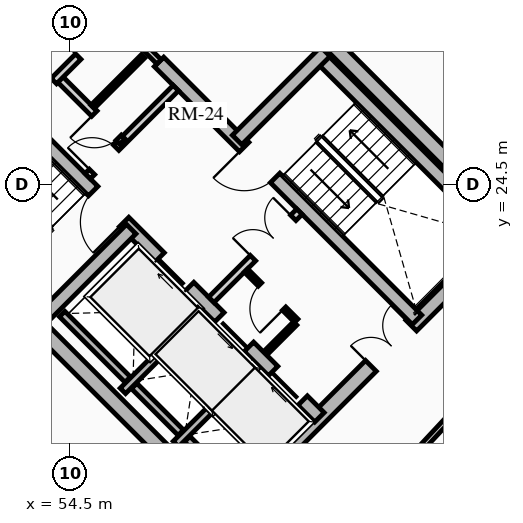
"""IFC4 building model, lengths in metres.
Left out: names, types, materials, properties, quantities, classifications, styles, units other than length and angle.
Written with IfcOpenShell. Run it as: python <this file> out.ifc"""

import sys

from ifc_helpers import new_model, si_unit, direction, frame, frame_2d, origin, place, context, subcontext, project, spatial, rectangle, extrude, source, transform, mapped, element, fill, save


model = new_model("IFC4")
c1 = context("Model", 3, precision=1e-05, world=origin(), true_north=direction((0.0, 1.0)))
c2 = subcontext(c1, "Body", "Model", "MODEL_VIEW")
j1 = project(units=[si_unit("LENGTHUNIT", "METRE"), si_unit("PLANEANGLEUNIT", "RADIAN")], contexts=[c1])
p1 = place(None, origin())
s1 = spatial("IfcSite", under=j1, at=p1, CompositionType="ELEMENT")
p2 = place(p1, origin())
s2 = spatial("IfcBuilding", under=s1, at=p2, CompositionType="ELEMENT")
p3 = place(p2, frame((0.0, 0.0, 208.3)))
s3 = spatial("IfcBuildingStorey", under=s2, at=p3, CompositionType="ELEMENT", Elevation=208.3)
for number, where, z_axis, x_axis in (
    (1, (58.702, 15.732, 0.0), (0.0, 0.0, 1.0), (-0.707, 0.707, 0.0)),
    (2, (66.268, 23.298, 0.0), (0.0, 0.0, 1.0), (-0.707, 0.707, 0.0)),
):
    element("IfcWall", number, at=place(p3, frame(where, z_axis=z_axis, x_axis=x_axis)), inside=s3, PredefinedType="SHEAR", context=c2, shape_type="SweptSolid", body=[
        extrude(rectangle(XDim=14.1, YDim=0.4, at=frame_2d((7.05, 0.0))), origin(), (0.0, 0.0, 1.0), 2.91),
    ])
p4 = place(p3, frame((58.561, 15.873, 0.0), z_axis=(0.0, 0.0, 1.0), x_axis=(0.707106781187, 0.707106781187, 0.0)))
e3 = element("IfcWall", 3, at=p4, inside=s3, PredefinedType="SHEAR", context=c2, shape_type="SweptSolid", body=[
    extrude(rectangle(XDim=10.7, YDim=0.4, at=frame_2d((5.35, 0.0))), origin(), (0.0, 0.0, 1.0), 2.91),
])
m1 = source(origin(), c2, "Body", "SweptSolid", [
    extrude(rectangle(XDim=1.5, YDim=2.02, at=frame_2d((0.75, 1.01))), frame((0.0, 0.21, 0.0), z_axis=(0.0, -1.0, 0.0), x_axis=(1.0, 0.0, 0.0)), (0.0, 0.0, 1.0), 0.42),
])
p5 = place(p4, frame((5.45, 0.0, 0.0)))
e4 = element("IfcOpeningElement", 4, at=p5, cuts=e3, PredefinedType="OPENING", context=c2, shape_type="MappedRepresentation", body=[
    mapped(m1, transform((0.0, 0.0, 0.0), x_axis=(1.0, 0.0, 0.0), y_axis=(0.0, 1.0, 0.0), z_axis=(0.0, 0.0, 1.0), scale=1.0)),
])
p6 = place(p3, frame((48.873, 25.561, 0.0), z_axis=(0.0, 0.0, 1.0), x_axis=(0.707106781187, 0.707106781187, 0.0)))
e5 = element("IfcWall", 5, at=p6, inside=s3, PredefinedType="SHEAR", context=c2, shape_type="SweptSolid", body=[
    extrude(rectangle(XDim=10.7, YDim=0.4, at=frame_2d((5.35, 0.0))), origin(), (0.0, 0.0, 1.0), 2.91),
])
p7 = place(p6, frame((4.6, 0.0, 0.0)))
e6 = element("IfcOpeningElement", 6, at=p7, cuts=e5, PredefinedType="OPENING", context=c2, shape_type="MappedRepresentation", body=[
    mapped(m1, transform((0.0, 0.0, 0.0), x_axis=(1.0, 0.0, 0.0), y_axis=(0.0, 1.0, 0.0), z_axis=(0.0, 0.0, 1.0), scale=1.0)),
])
p8 = place(p3, frame((61.06, 18.373, 0.0), z_axis=(0.0, 0.0, 1.0), x_axis=(-0.707106781187, 0.707106781187, 0.0)))
e7 = element("IfcWall", 7, at=p8, inside=s3, PredefinedType="SHEAR", context=c2, shape_type="SweptSolid", body=[
    extrude(rectangle(XDim=13.7, YDim=0.35, at=frame_2d((6.85, 0.0))), origin(), (0.0, 0.0, 1.0), 2.91),
])
m2 = source(origin(), c2, "Body", "SweptSolid", [
    extrude(rectangle(XDim=1.1, YDim=2.015, at=frame_2d((0.55, 1.007))), frame((0.0, 0.185, 0.0), z_axis=(0.0, -1.0, 0.0), x_axis=(1.0, 0.0, 0.0)), (0.0, 0.0, 1.0), 0.37),
])
p9 = place(p8, frame((4.85, 0.0, 0.0)))
e8 = element("IfcOpeningElement", 8, at=p9, cuts=e7, PredefinedType="OPENING", context=c2, shape_type="MappedRepresentation", body=[
    mapped(m2, transform((0.0, 0.0, 0.0), x_axis=(1.0, 0.0, 0.0), y_axis=(0.0, 1.0, 0.0), z_axis=(0.0, 0.0, 1.0), scale=1.0)),
])
p10 = place(p8, frame((0.625, 0.0, 0.0)))
e9 = element("IfcOpeningElement", 9, at=p10, cuts=e7, PredefinedType="OPENING", context=c2, shape_type="MappedRepresentation", body=[
    mapped(m2, transform((0.0, 0.0, 0.0), x_axis=(1.0, 0.0, 0.0), y_axis=(0.0, 1.0, 0.0), z_axis=(0.0, 0.0, 1.0), scale=1.0)),
])
p11 = place(p8, frame((2.625, 0.0, 0.0)))
e10 = element("IfcOpeningElement", 10, at=p11, cuts=e7, PredefinedType="OPENING", context=c2, shape_type="MappedRepresentation", body=[
    mapped(m2, transform((0.0, 0.0, 0.0), x_axis=(1.0, 0.0, 0.0), y_axis=(0.0, 1.0, 0.0), z_axis=(0.0, 0.0, 1.0), scale=1.0)),
])
m3 = source(origin(), c2, "Body", "SweptSolid", [
    extrude(rectangle(XDim=1.15, YDim=2.02, at=frame_2d((0.575, 1.01))), frame((0.0, 0.185, 0.0), z_axis=(0.0, -1.0, 0.0), x_axis=(1.0, 0.0, 0.0)), (0.0, 0.0, 1.0), 0.37),
])
p12 = place(p8, frame((7.27, 0.0, 0.0)))
e11 = element("IfcOpeningElement", 11, at=p12, cuts=e7, PredefinedType="OPENING", context=c2, shape_type="MappedRepresentation", body=[
    mapped(m3, transform((0.0, 0.0, 0.0), x_axis=(1.0, 0.0, 0.0), y_axis=(0.0, 1.0, 0.0), z_axis=(0.0, 0.0, 1.0), scale=1.0)),
])
p13 = place(p3, frame((63.627, 20.94, 0.0), z_axis=(0.0, 0.0, 1.0), x_axis=(-0.707119496762, 0.707094065383, 0.0)))
e12 = element("IfcWall", 12, at=p13, inside=s3, PredefinedType="SHEAR", context=c2, shape_type="SweptSolid", body=[
    extrude(rectangle(XDim=9.6, YDim=0.35, at=frame_2d((4.8, 0.0))), origin(), (0.0, 0.0, 1.0), 2.91),
])
p14 = place(p13, frame((5.28, 0.0, 0.0)))
e13 = element("IfcOpeningElement", 13, at=p14, cuts=e12, PredefinedType="OPENING", context=c2, shape_type="MappedRepresentation", body=[
    mapped(m3, transform((0.0, 0.0, 0.0), x_axis=(1.0, 0.0, 0.0), y_axis=(0.0, 1.0, 0.0), z_axis=(0.0, 0.0, 1.0), scale=1.0)),
])
p15 = place(p3, frame((53.922, 21.141, 0.0), z_axis=(0.0, 0.0, 1.0), x_axis=(-0.707106781187, 0.707106781187, 0.0)))
e14 = element("IfcWall", 14, at=p15, inside=s3, PredefinedType="SHEAR", context=c2, shape_type="SweptSolid", body=[
    extrude(rectangle(XDim=6.695, YDim=0.35, at=frame_2d((3.348, 0.0))), origin(), (0.0, 0.0, 1.0), 2.91),
])
p16 = place(p3, frame((53.784, 21.003, 0.0), z_axis=(0.0, 0.0, 1.0), x_axis=(0.707106781187, 0.707106781187, 0.0)))
e15 = element("IfcWall", 15, at=p16, inside=s3, PredefinedType="SHEAR", context=c2, shape_type="SweptSolid", body=[
    extrude(rectangle(XDim=3.285, YDim=0.35, at=frame_2d((1.643, 0.0))), origin(), (0.0, 0.0, 1.0), 2.91),
])
p17 = place(p3, frame((65.812, 23.125, 0.0), z_axis=(0.0, 0.0, 1.0), x_axis=(-0.707106781187, 0.707106781187, 0.0)))
e16 = element("IfcWall", 16, at=p17, inside=s3, PredefinedType="SHEAR", context=c2, shape_type="SweptSolid", body=[
    extrude(rectangle(XDim=6.695, YDim=0.35, at=frame_2d((3.348, 0.0))), origin(), (0.0, 0.0, 1.0), 2.91),
])
p18 = place(p3, frame((58.893, 25.674, 0.0), z_axis=(0.0, 0.0, 1.0), x_axis=(0.707106781187, 0.707106781187, 0.0)))
e17 = element("IfcWall", 17, at=p18, inside=s3, PredefinedType="SHEAR", context=c2, shape_type="SweptSolid", body=[
    extrude(rectangle(XDim=3.285, YDim=0.35, at=frame_2d((1.643, 0.0))), origin(), (0.0, 0.0, 1.0), 2.91),
])
p19 = place(p3, frame((55.888, 19.069, 0.0), z_axis=(0.0, 0.0, 1.0), x_axis=(0.707106781187, 0.707106781187, 0.0)))
e18 = element("IfcWall", 18, at=p19, inside=s3, PredefinedType="SHEAR", context=c2, shape_type="SweptSolid", body=[
    extrude(rectangle(XDim=2.97, YDim=0.2, at=frame_2d((1.485, 0.0))), origin(), (0.0, 0.0, 1.0), 2.91),
])
p20 = place(p3, frame((56.015, 19.366, 0.0), z_axis=(0.0, 0.0, 1.0), x_axis=(-0.707106781187, 0.707106781187, 0.0)))
e19 = element("IfcWall", 19, at=p20, inside=s3, PredefinedType="SHEAR", context=c2, shape_type="SweptSolid", body=[
    extrude(rectangle(XDim=2.44, YDim=0.2, at=frame_2d((1.22, 0.0))), origin(), (0.0, 0.0, 1.0), 2.91),
])
p21 = place(p3, frame((57.284, 17.673, 0.0), z_axis=(0.0, 0.0, 1.0), x_axis=(0.707147878904, 0.70706568108, 0.0)))
e20 = element("IfcWall", 20, at=p21, inside=s3, PredefinedType="SHEAR", context=c2, shape_type="SweptSolid", body=[
    extrude(rectangle(XDim=2.97, YDim=0.2, at=frame_2d((1.485, 0.0))), origin(), (0.0, 0.0, 1.0), 2.91),
])
p22 = place(p3, frame((57.412, 17.97, 0.0), z_axis=(0.0, 0.0, 1.0), x_axis=(-0.707106781187, 0.707106781187, 0.0)))
e21 = element("IfcWall", 21, at=p22, inside=s3, PredefinedType="SHEAR", context=c2, shape_type="SweptSolid", body=[
    extrude(rectangle(XDim=1.735, YDim=0.2, at=frame_2d((0.867, 0.0))), origin(), (0.0, 0.0, 1.0), 2.91),
])
p23 = place(p3, frame((58.737, 16.644, 0.0), z_axis=(0.0, 0.0, 1.0), x_axis=(-0.707032117043, 0.707181437447, 0.0)))
e22 = element("IfcWall", 22, at=p23, inside=s3, PredefinedType="SHEAR", context=c2, shape_type="SweptSolid", body=[
    extrude(rectangle(XDim=1.635, YDim=0.2, at=frame_2d((0.817, 0.0))), origin(), (0.0, 0.0, 1.0), 2.91),
])
p24 = place(p3, frame((58.214, 21.467, 0.0), z_axis=(0.0, 0.0, 1.0), x_axis=(0.707106781187, 0.707106781187, 0.0)))
e23 = element("IfcWall", 23, at=p24, inside=s3, PredefinedType="PARTITIONING", context=c2, shape_type="SweptSolid", body=[
    extrude(rectangle(XDim=3.28, YDim=0.2, at=frame_2d((1.64, 0.0))), origin(), (0.0, 0.0, 1.0), 2.685),
])
m4 = source(origin(), c2, "Body", "SweptSolid", [
    extrude(rectangle(XDim=1.5, YDim=2.02, at=frame_2d((0.75, 1.01))), frame((0.0, 0.11, 0.0), z_axis=(0.0, -1.0, 0.0), x_axis=(1.0, 0.0, 0.0)), (0.0, 0.0, 1.0), 0.22),
])
p25 = place(p24, frame((1.55, 0.0, 0.0)))
e24 = element("IfcOpeningElement", 24, at=p25, cuts=e23, PredefinedType="OPENING", context=c2, shape_type="MappedRepresentation", body=[
    mapped(m4, transform((0.0, 0.0, 0.0), x_axis=(1.0, 0.0, 0.0), y_axis=(0.0, 1.0, 0.0), z_axis=(0.0, 0.0, 1.0), scale=1.0)),
])
p26 = place(p3, frame((54.961, 24.719, 0.0), z_axis=(0.0, 0.0, 1.0), x_axis=(0.707106781187, 0.707106781187, 0.0)))
e25 = element("IfcWall", 25, at=p26, inside=s3, PredefinedType="PARTITIONING", context=c2, shape_type="SweptSolid", body=[
    extrude(rectangle(XDim=3.28, YDim=0.2, at=frame_2d((1.64, 0.0))), origin(), (0.0, 0.0, 1.0), 2.685),
])
m5 = source(origin(), c2, "Body", "SweptSolid", [
    extrude(rectangle(XDim=0.9, YDim=2.005, at=frame_2d((0.45, 1.002))), frame((0.0, 0.11, 0.0), z_axis=(0.0, -1.0, 0.0), x_axis=(1.0, 0.0, 0.0)), (0.0, 0.0, 1.0), 0.22),
])
p27 = place(p26, frame((0.16, 0.0, 0.0)))
e26 = element("IfcOpeningElement", 26, at=p27, cuts=e25, PredefinedType="OPENING", context=c2, shape_type="MappedRepresentation", body=[
    mapped(m5, transform((0.0, 0.0, 0.0), x_axis=(1.0, 0.0, 0.0), y_axis=(0.0, 1.0, 0.0), z_axis=(0.0, 0.0, 1.0), scale=1.0)),
])
p28 = place(p3, frame((55.874, 25.631, 0.0), z_axis=(0.0, 0.0, 1.0), x_axis=(-0.707157639372, 0.707055919343, 0.0)))
e27 = element("IfcWall", 27, at=p28, inside=s3, PredefinedType="PARTITIONING", context=c2, shape_type="SweptSolid", body=[
    extrude(rectangle(XDim=2.4, YDim=0.2, at=frame_2d((1.2, 0.0))), origin(), (0.0, 0.0, 1.0), 2.685),
])
p29 = place(p28, frame((0.14, 0.0, 0.0)))
e28 = element("IfcOpeningElement", 28, at=p29, cuts=e27, PredefinedType="OPENING", context=c2, shape_type="MappedRepresentation", body=[
    mapped(m5, transform((0.0, 0.0, 0.0), x_axis=(1.0, 0.0, 0.0), y_axis=(0.0, 1.0, 0.0), z_axis=(0.0, 0.0, 1.0), scale=1.0)),
])
p30 = place(p3, frame((53.264, 26.416, 0.0), z_axis=(0.0, 0.0, 1.0), x_axis=(0.707106781187, 0.707106781187, 0.0)))
e29 = element("IfcWall", 29, at=p30, inside=s3, PredefinedType="PARTITIONING", context=c2, shape_type="SweptSolid", body=[
    extrude(rectangle(XDim=3.28, YDim=0.2, at=frame_2d((1.64, 0.0))), origin(), (0.0, 0.0, 1.0), 2.685),
])
m6 = source(origin(), c2, "Body", "SweptSolid", [
    extrude(rectangle(XDim=1.0, YDim=2.015, at=frame_2d((0.5, 1.007))), frame((0.0, 0.11, 0.0), z_axis=(0.0, -1.0, 0.0), x_axis=(1.0, 0.0, 0.0)), (0.0, 0.0, 1.0), 0.22),
])
p31 = place(p30, frame((0.14, 0.0, 0.0)))
e30 = element("IfcOpeningElement", 30, at=p31, cuts=e29, PredefinedType="OPENING", context=c2, shape_type="MappedRepresentation", body=[
    mapped(m6, transform((0.0, 0.0, 0.0), x_axis=(1.0, 0.0, 0.0), y_axis=(0.0, 1.0, 0.0), z_axis=(0.0, 0.0, 1.0), scale=1.0)),
])
p32 = place(p30, frame((2.05, 0.0, 0.0)))
e31 = element("IfcOpeningElement", 31, at=p32, cuts=e29, PredefinedType="OPENING", context=c2, shape_type="MappedRepresentation", body=[
    mapped(m5, transform((0.0, 0.0, 0.0), x_axis=(1.0, 0.0, 0.0), y_axis=(0.0, 1.0, 0.0), z_axis=(0.0, 0.0, 1.0), scale=1.0)),
])
p33 = place(p3, frame((60.448, 20.915, 0.0), z_axis=(0.0, 0.0, 1.0), x_axis=(-0.707106781187, 0.707106781187, 0.0)))
e32 = element("IfcWall", 32, at=p33, inside=s3, PredefinedType="PARTITIONING", context=c2, shape_type="SweptSolid", body=[
    extrude(rectangle(XDim=1.87, YDim=0.125, at=frame_2d((0.935, 0.0))), origin(), (0.0, 0.0, 1.0), 2.685),
])
m7 = source(origin(), c2, "Body", "SweptSolid", [
    extrude(rectangle(XDim=0.9, YDim=2.005, at=frame_2d((0.45, 1.002))), frame((0.0, 0.073, 0.0), z_axis=(0.0, -1.0, 0.0), x_axis=(1.0, 0.0, 0.0)), (0.0, 0.0, 1.0), 0.145),
])
p34 = place(p33, frame((0.45, 0.0, 0.0)))
e33 = element("IfcOpeningElement", 33, at=p34, cuts=e32, PredefinedType="OPENING", context=c2, shape_type="MappedRepresentation", body=[
    mapped(m7, transform((0.0, 0.0, 0.0), x_axis=(1.0, 0.0, 0.0), y_axis=(0.0, 1.0, 0.0), z_axis=(0.0, 0.0, 1.0), scale=1.0)),
])
p35 = place(p3, frame((59.643, 20.066, 0.0), z_axis=(0.0, 0.0, 1.0), x_axis=(0.707106781187, 0.707106781187, 0.0)))
e34 = element("IfcWall", 34, at=p35, inside=s3, PredefinedType="PARTITIONING", context=c2, shape_type="SweptSolid", body=[
    extrude(rectangle(XDim=1.1, YDim=0.125, at=frame_2d((0.55, 0.0))), origin(), (0.0, 0.0, 1.0), 2.685),
])
p36 = place(p3, frame((55.089, 26.543, 0.0), z_axis=(0.0, 0.0, 1.0), x_axis=(0.707106781187, 0.707106781187, 0.0)))
e35 = element("IfcWall", 35, at=p36, inside=s3, PredefinedType="PARTITIONING", context=c2, shape_type="SweptSolid", body=[
    extrude(rectangle(XDim=1.88, YDim=0.125, at=frame_2d((0.94, 0.0))), origin(), (0.0, 0.0, 1.0), 2.685),
])
p37 = place(p3, frame((56.839, 27.728, 0.0), z_axis=(0.0, 0.0, 1.0), x_axis=(-0.707106781187, 0.707106781187, 0.0)))
e36 = element("IfcWall", 36, at=p37, inside=s3, PredefinedType="PARTITIONING", context=c2, shape_type="SweptSolid", body=[
    extrude(rectangle(XDim=3.9, YDim=0.16, at=frame_2d((1.95, 0.0))), origin(), (0.0, 0.0, 1.0), 2.685),
])
m8 = source(origin(), c2, "Body", "SweptSolid", [
    extrude(rectangle(XDim=0.9, YDim=2.005, at=frame_2d((0.45, 1.002))), frame((0.0, 0.09, 0.0), z_axis=(0.0, -1.0, 0.0), x_axis=(1.0, 0.0, 0.0)), (0.0, 0.0, 1.0), 0.18),
])
p38 = place(p37, frame((2.2, 0.0, 0.0)))
e37 = element("IfcOpeningElement", 37, at=p38, cuts=e36, PredefinedType="OPENING", context=c2, shape_type="MappedRepresentation", body=[
    mapped(m8, transform((0.0, 0.0, 0.0), x_axis=(1.0, 0.0, 0.0), y_axis=(0.0, 1.0, 0.0), z_axis=(0.0, 0.0, 1.0), scale=1.0)),
])
p39 = place(p3, frame((51.914, 18.914, 0.0), z_axis=(0.0, 0.0, 1.0), x_axis=(0.699999313799, -0.714143515465, 0.0)))
e38 = element("IfcWall", 38, at=p39, inside=s3, PredefinedType="PARTITIONING", context=c2, shape_type="SweptSolid", body=[
    extrude(rectangle(XDim=6.162, YDim=0.15, at=frame_2d((3.081, 0.0))), origin(), (0.0, 0.0, 1.0), 2.255),
])
p40 = place(p3, frame((62.903, 16.667, 0.0), z_axis=(0.0, 0.0, 1.0), x_axis=(0.682371947497, 0.731005147225, 0.0)))
e39 = element("IfcWall", 39, at=p40, inside=s3, PredefinedType="PARTITIONING", context=c2, shape_type="SweptSolid", body=[
    extrude(rectangle(XDim=6.642, YDim=0.15, at=frame_2d((3.321, 0.0))), origin(), (0.0, 0.0, 1.0), 2.255),
])
m9 = source(origin(), c2, "Body", "SweptSolid", [
    extrude(rectangle(XDim=1.05, YDim=2.015, at=frame_2d((0.525, 1.007))), frame((0.0, 0.085, 0.0), z_axis=(0.0, -1.0, 0.0), x_axis=(1.0, 0.0, 0.0)), (0.0, 0.0, 1.0), 0.17),
])
p41 = place(p40, frame((2.796, 0.0, 0.0)))
e40 = element("IfcOpeningElement", 40, at=p41, cuts=e39, PredefinedType="OPENING", context=c2, shape_type="MappedRepresentation", body=[
    mapped(m9, transform((0.0, 0.0, 0.0), x_axis=(1.0, 0.0, 0.0), y_axis=(0.0, 1.0, 0.0), z_axis=(0.0, 0.0, 1.0), scale=1.0)),
])
m10 = source(origin(), c2, "Body", "SweptSolid", [
    extrude(rectangle(XDim=1.1, YDim=2.015, at=frame_2d((0.55, 1.007))), frame((0.0, 0.025, 0.0), z_axis=(0.0, -1.0, 0.0), x_axis=(1.0, 0.0, 0.0)), (0.0, 0.0, 1.0), 0.05),
])
p42 = place(p9, origin())
e41 = element("IfcDoor", 41, at=p42, inside=s3, OperationType="SLIDING_TO_RIGHT", PredefinedType="DOOR", context=c2, shape_type="MappedRepresentation", body=[
    mapped(m10, transform((0.0, 0.0, 0.0), x_axis=(1.0, 0.0, 0.0), y_axis=(0.0, 1.0, 0.0), z_axis=(0.0, 0.0, 1.0), scale=1.0)),
])
fill(e8, e41)
p43 = place(p10, origin())
e42 = element("IfcDoor", 42, at=p43, inside=s3, OperationType="SLIDING_TO_RIGHT", PredefinedType="DOOR", context=c2, shape_type="MappedRepresentation", body=[
    mapped(m10, transform((0.0, 0.0, 0.0), x_axis=(1.0, 0.0, 0.0), y_axis=(0.0, 1.0, 0.0), z_axis=(0.0, 0.0, 1.0), scale=1.0)),
])
fill(e9, e42)
p44 = place(p11, origin())
e43 = element("IfcDoor", 43, at=p44, inside=s3, OperationType="SLIDING_TO_LEFT", PredefinedType="DOOR", context=c2, shape_type="MappedRepresentation", body=[
    mapped(m10, transform((0.0, 0.0, 0.0), x_axis=(1.0, 0.0, 0.0), y_axis=(0.0, 1.0, 0.0), z_axis=(0.0, 0.0, 1.0), scale=1.0)),
])
fill(e10, e43)
m11 = source(origin(), c2, "Body", "SweptSolid", [
    extrude(rectangle(XDim=1.15, YDim=2.02, at=frame_2d((0.575, 1.01))), frame((0.0, 0.025, 0.0), z_axis=(0.0, -1.0, 0.0), x_axis=(1.0, 0.0, 0.0)), (0.0, 0.0, 1.0), 0.05),
])
p45 = place(p12, origin())
e44 = element("IfcDoor", 44, at=p45, inside=s3, OperationType="SINGLE_SWING_LEFT", PredefinedType="DOOR", context=c2, shape_type="MappedRepresentation", body=[
    mapped(m11, transform((0.0, 0.0, 0.0), x_axis=(1.0, 0.0, 0.0), y_axis=(0.0, 1.0, 0.0), z_axis=(0.0, 0.0, 1.0), scale=1.0)),
])
fill(e11, e44)
p46 = place(p14, origin())
e45 = element("IfcDoor", 45, at=p46, inside=s3, OperationType="SINGLE_SWING_RIGHT", PredefinedType="DOOR", context=c2, shape_type="MappedRepresentation", body=[
    mapped(m11, transform((0.0, 0.0, 0.0), x_axis=(1.0, 0.0, 0.0), y_axis=(0.0, 1.0, 0.0), z_axis=(0.0, 0.0, 1.0), scale=1.0)),
])
fill(e13, e45)
m12 = source(origin(), c2, "Body", "SweptSolid", [
    extrude(rectangle(XDim=1.5, YDim=2.02, at=frame_2d((0.75, 1.01))), frame((0.0, 0.025, 0.0), z_axis=(0.0, -1.0, 0.0), x_axis=(1.0, 0.0, 0.0)), (0.0, 0.0, 1.0), 0.05),
])
p47 = place(p5, origin())
e46 = element("IfcDoor", 46, at=p47, inside=s3, OperationType="DOUBLE_DOOR_SINGLE_SWING", PredefinedType="DOOR", context=c2, shape_type="MappedRepresentation", body=[
    mapped(m12, transform((0.0, 0.0, 0.0), x_axis=(1.0, 0.0, 0.0), y_axis=(0.0, 1.0, 0.0), z_axis=(0.0, 0.0, 1.0), scale=1.0)),
])
fill(e4, e46)
p48 = place(p25, origin())
e47 = element("IfcDoor", 47, at=p48, inside=s3, OperationType="DOUBLE_DOOR_SINGLE_SWING", PredefinedType="DOOR", context=c2, shape_type="MappedRepresentation", body=[
    mapped(m12, transform((0.0, 0.0, 0.0), x_axis=(1.0, 0.0, 0.0), y_axis=(0.0, 1.0, 0.0), z_axis=(0.0, 0.0, 1.0), scale=1.0)),
])
fill(e24, e47)
m13 = source(origin(), c2, "Body", "SweptSolid", [
    extrude(rectangle(XDim=0.9, YDim=2.005, at=frame_2d((0.45, 1.002))), frame((0.0, 0.025, 0.0), z_axis=(0.0, -1.0, 0.0), x_axis=(1.0, 0.0, 0.0)), (0.0, 0.0, 1.0), 0.05),
])
p49 = place(p27, origin())
e48 = element("IfcDoor", 48, at=p49, inside=s3, OperationType="SINGLE_SWING_LEFT", PredefinedType="DOOR", context=c2, shape_type="MappedRepresentation", body=[
    mapped(m13, transform((0.0, 0.0, 0.0), x_axis=(1.0, 0.0, 0.0), y_axis=(0.0, 1.0, 0.0), z_axis=(0.0, 0.0, 1.0), scale=1.0)),
])
fill(e26, e48)
m14 = source(origin(), c2, "Body", "SweptSolid", [
    extrude(rectangle(XDim=1.0, YDim=2.015, at=frame_2d((0.5, 1.007))), frame((0.0, 0.025, 0.0), z_axis=(0.0, -1.0, 0.0), x_axis=(1.0, 0.0, 0.0)), (0.0, 0.0, 1.0), 0.05),
])
p50 = place(p31, origin())
e49 = element("IfcDoor", 49, at=p50, inside=s3, OperationType="SINGLE_SWING_RIGHT", PredefinedType="DOOR", context=c2, shape_type="MappedRepresentation", body=[
    mapped(m14, transform((0.0, 0.0, 0.0), x_axis=(1.0, 0.0, 0.0), y_axis=(0.0, 1.0, 0.0), z_axis=(0.0, 0.0, 1.0), scale=1.0)),
])
fill(e30, e49)
p51 = place(p34, origin())
e50 = element("IfcDoor", 50, at=p51, inside=s3, OperationType="SINGLE_SWING_LEFT", PredefinedType="DOOR", context=c2, shape_type="MappedRepresentation", body=[
    mapped(m13, transform((0.0, 0.0, 0.0), x_axis=(1.0, 0.0, 0.0), y_axis=(0.0, 1.0, 0.0), z_axis=(0.0, 0.0, 1.0), scale=1.0)),
])
fill(e33, e50)
p52 = place(p29, origin())
e51 = element("IfcDoor", 51, at=p52, inside=s3, OperationType="SINGLE_SWING_RIGHT", PredefinedType="DOOR", context=c2, shape_type="MappedRepresentation", body=[
    mapped(m13, transform((0.0, 0.0, 0.0), x_axis=(1.0, 0.0, 0.0), y_axis=(0.0, 1.0, 0.0), z_axis=(0.0, 0.0, 1.0), scale=1.0)),
])
fill(e28, e51)
p53 = place(p32, origin())
e52 = element("IfcDoor", 52, at=p53, inside=s3, OperationType="SINGLE_SWING_LEFT", PredefinedType="DOOR", context=c2, shape_type="MappedRepresentation", body=[
    mapped(m13, transform((0.0, 0.0, 0.0), x_axis=(1.0, 0.0, 0.0), y_axis=(0.0, 1.0, 0.0), z_axis=(0.0, 0.0, 1.0), scale=1.0)),
])
fill(e31, e52)
save(model, sys.argv[1])
